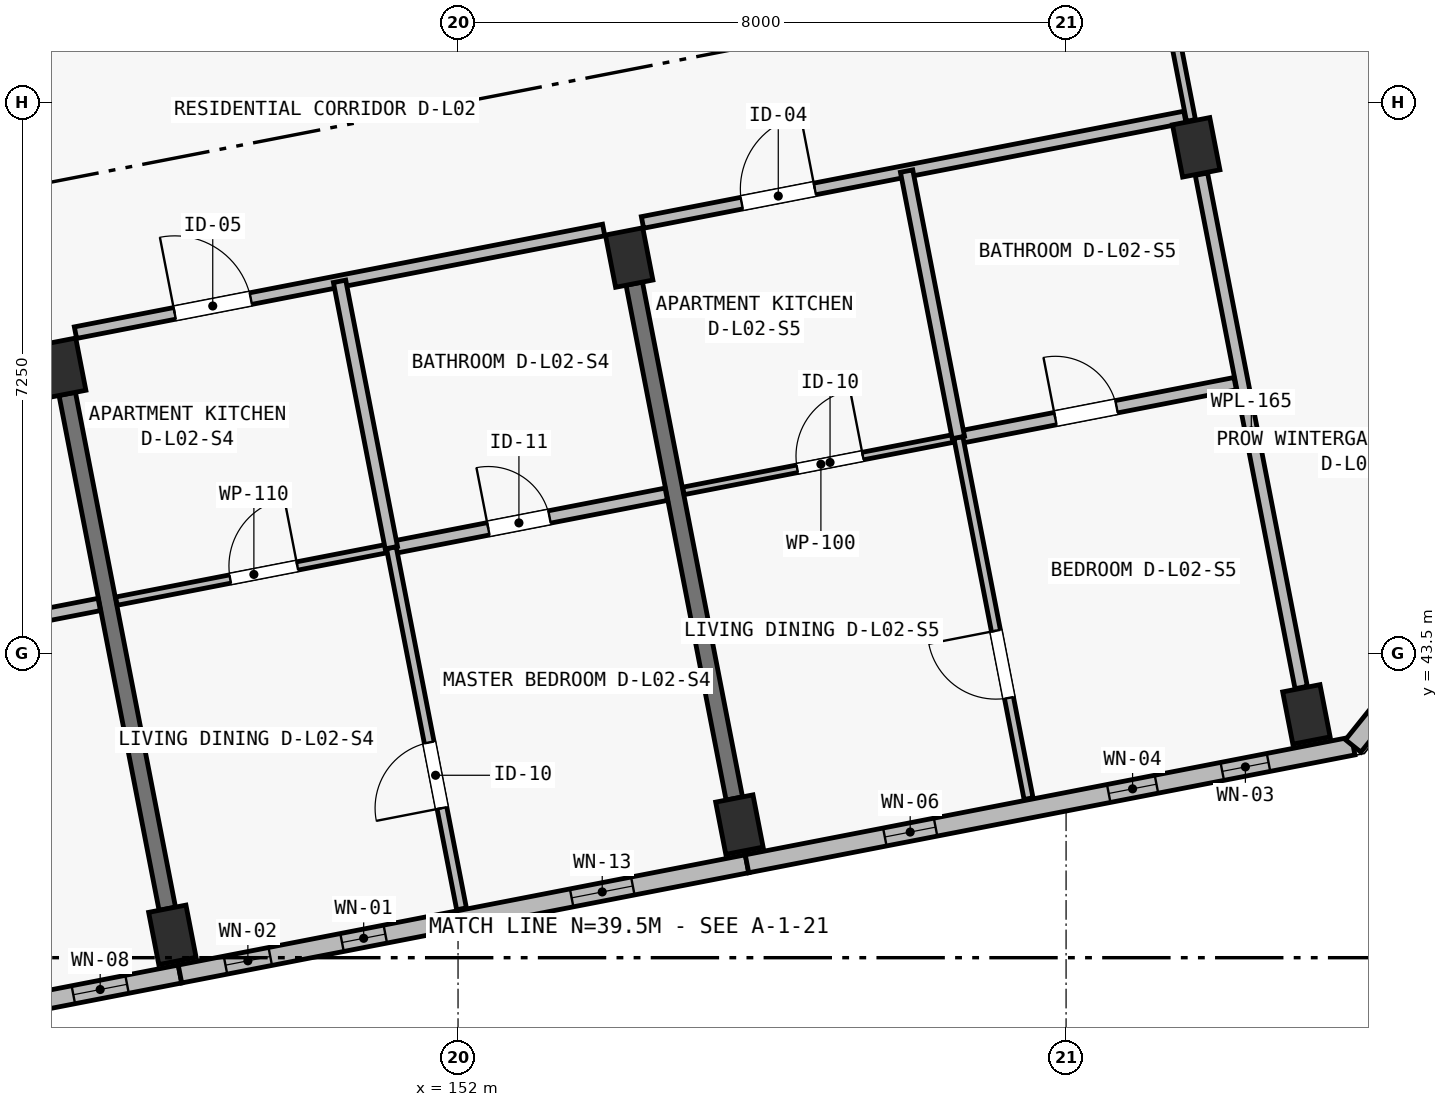
"""IFC4 building model, lengths in metres.
Left out: names, types, materials, properties, quantities, classifications, styles, units other than length and angle.
Written with IfcOpenShell. Run it as: python <this file> out.ifc"""

import sys

from ifc_helpers import new_model, si_unit, direction, frame, frame_2d, origin, origin_2d, place, context, subcontext, project, spatial, rectangle, extrude, element, fill, save


model = new_model("IFC4")
c1 = context("Model", 3, precision=1e-05, world=origin(), true_north=direction((0.0, 1.0)))
c2 = subcontext(c1, "Body", "Model", "MODEL_VIEW")
j1 = project(units=[si_unit("LENGTHUNIT", "METRE"), si_unit("PLANEANGLEUNIT", "RADIAN")], contexts=[c1])
p1 = place(None, origin())
s1 = spatial("IfcSite", under=j1, at=p1, CompositionType="ELEMENT")
p2 = place(p1, origin())
s2 = spatial("IfcBuilding", under=s1, at=p2, CompositionType="ELEMENT")
p3 = place(p2, frame((0.0, 0.0, 8.4)))
s3 = spatial("IfcBuildingStorey", under=s2, at=p3, CompositionType="ELEMENT", Elevation=8.4)
for number, where, z_axis, x_axis in (
    (1, (148.241, 39.801, 0.0), (0.0, 0.0, 1.0), (0.982, 0.191, 0.0)),
    (2, (146.791, 47.261, 0.0), (0.0, 0.0, 1.0), (0.982, 0.191, 0.0)),
    (3, (155.702, 41.251, 0.0), (0.0, 0.0, 1.0), (0.982, 0.191, 0.0)),
    (4, (154.252, 48.711, 0.0), (0.0, 0.0, 1.0), (0.982, 0.191, 0.0)),
    (5, (163.162, 42.701, 0.0), (0.0, 0.0, 1.0), (0.982, 0.191, 0.0)),
    (6, (161.712, 50.161, 0.0), (0.0, 0.0, 1.0), (0.982, 0.191, 0.0)),
):
    element("IfcColumn", number, at=place(p3, frame(where, z_axis=z_axis, x_axis=x_axis)), inside=s3, PredefinedType="COLUMN", context=c2, shape_type="SweptSolid", body=[
        extrude(rectangle(XDim=0.5, YDim=0.7, at=origin_2d()), origin(), (0.0, 0.0, 1.0), 3.25),
    ])
p4 = place(p3, frame((148.175, 40.144, 0.0), z_axis=(0.0, 0.0, 1.0), x_axis=(-0.190812837813, 0.981626436546, 0.0)))
e7 = element("IfcWall", 7, at=p4, inside=s3, PredefinedType="SHEAR", context=c2, shape_type="SweptSolid", body=[
    extrude(rectangle(XDim=6.9, YDim=0.22, at=frame_2d((3.45, 0.0))), origin(), (0.0, 0.0, 1.0), 2.5),
])
p5 = place(p3, frame((155.635, 41.594, 0.0), z_axis=(0.0, 0.0, 1.0), x_axis=(-0.190819465253, 0.981625148252, 0.0)))
e8 = element("IfcWall", 8, at=p5, inside=s3, PredefinedType="SHEAR", context=c2, shape_type="SweptSolid", body=[
    extrude(rectangle(XDim=6.9, YDim=0.22, at=frame_2d((3.45, 0.0))), origin(), (0.0, 0.0, 1.0), 2.5),
])
p6 = place(p3, frame((148.342, 39.285, 0.0), z_axis=(0.0, 0.0, 1.0), x_axis=(-0.981631269434, -0.190787973596, 0.0)))
e9 = element("IfcWall", 9, at=p6, inside=s3, PredefinedType="SOLIDWALL", context=c2, shape_type="SweptSolid", body=[
    extrude(rectangle(XDim=7.6, YDim=0.24, at=frame_2d((3.8, 0.0))), origin(), (0.0, 0.0, 1.0), 3.0),
])
p7 = place(p6, frame((0.71, 0.0, 0.52)))
e10 = element("IfcOpeningElement", 10, at=p7, cuts=e9, PredefinedType="OPENING", context=c2, shape_type="SweptSolid", body=[
    extrude(rectangle(XDim=0.72, YDim=2.16, at=frame_2d((0.36, 1.08))), frame((0.0, 0.135, 0.0), z_axis=(0.0, -1.0, 0.0), x_axis=(1.0, 0.0, 0.0)), (0.0, 0.0, 1.0), 0.27),
])
p8 = place(p6, frame((3.504, 0.0, 0.52)))
e11 = element("IfcOpeningElement", 11, at=p8, cuts=e9, PredefinedType="OPENING", context=c2, shape_type="SweptSolid", body=[
    extrude(rectangle(XDim=0.78, YDim=2.2, at=frame_2d((0.39, 1.1))), frame((0.0, 0.135, 0.0), z_axis=(0.0, -1.0, 0.0), x_axis=(1.0, 0.0, 0.0)), (0.0, 0.0, 1.0), 0.27),
])
p9 = place(p3, frame((155.802, 40.735, 0.0), z_axis=(0.0, 0.0, 1.0), x_axis=(-0.981626422232, -0.190812911449, 0.0)))
e12 = element("IfcWall", 12, at=p9, inside=s3, PredefinedType="SOLIDWALL", context=c2, shape_type="SweptSolid", body=[
    extrude(rectangle(XDim=7.6, YDim=0.24, at=frame_2d((3.8, 0.0))), origin(), (0.0, 0.0, 1.0), 3.0),
])
p10 = place(p9, frame((1.531, 0.0, 0.42)))
e13 = element("IfcOpeningElement", 13, at=p10, cuts=e12, PredefinedType="OPENING", context=c2, shape_type="SweptSolid", body=[
    extrude(rectangle(XDim=0.82, YDim=2.18, at=frame_2d((0.41, 1.09))), frame((0.0, 0.135, 0.0), z_axis=(0.0, -1.0, 0.0), x_axis=(1.0, 0.0, 0.0)), (0.0, 0.0, 1.0), 0.27),
])
p11 = place(p9, frame((4.848, 0.0, 0.42)))
e14 = element("IfcOpeningElement", 14, at=p11, cuts=e12, PredefinedType="OPENING", context=c2, shape_type="SweptSolid", body=[
    extrude(rectangle(XDim=0.58, YDim=2.16, at=frame_2d((0.29, 1.08))), frame((0.0, 0.135, 0.0), z_axis=(0.0, -1.0, 0.0), x_axis=(1.0, 0.0, 0.0)), (0.0, 0.0, 1.0), 0.27),
])
p12 = place(p9, frame((6.39, 0.0, 0.48)))
e15 = element("IfcOpeningElement", 15, at=p12, cuts=e12, PredefinedType="OPENING", context=c2, shape_type="SweptSolid", body=[
    extrude(rectangle(XDim=0.6, YDim=2.22, at=frame_2d((0.3, 1.11))), frame((0.0, 0.135, 0.0), z_axis=(0.0, -1.0, 0.0), x_axis=(1.0, 0.0, 0.0)), (0.0, 0.0, 1.0), 0.27),
])
p13 = place(p3, frame((163.778, 42.286, 0.0), z_axis=(0.0, 0.0, 1.0), x_axis=(-0.981628367112, -0.190802905848, 0.0)))
e16 = element("IfcWall", 16, at=p13, inside=s3, PredefinedType="SOLIDWALL", context=c2, shape_type="SweptSolid", body=[
    extrude(rectangle(XDim=8.125, YDim=0.24, at=frame_2d((4.062, 0.0))), origin(), (0.0, 0.0, 1.0), 3.0),
])
p14 = place(p13, frame((1.135, 0.0, 0.48)))
e17 = element("IfcOpeningElement", 17, at=p14, cuts=e16, PredefinedType="OPENING", context=c2, shape_type="SweptSolid", body=[
    extrude(rectangle(XDim=0.62, YDim=2.28, at=frame_2d((0.31, 1.14))), frame((0.0, 0.135, 0.0), z_axis=(0.0, -1.0, 0.0), x_axis=(1.0, 0.0, 0.0)), (0.0, 0.0, 1.0), 0.27),
])
p15 = place(p13, frame((2.637, 0.0, 0.52)))
e18 = element("IfcOpeningElement", 18, at=p15, cuts=e16, PredefinedType="OPENING", context=c2, shape_type="SweptSolid", body=[
    extrude(rectangle(XDim=0.64, YDim=2.18, at=frame_2d((0.32, 1.09))), frame((0.0, 0.135, 0.0), z_axis=(0.0, -1.0, 0.0), x_axis=(1.0, 0.0, 0.0)), (0.0, 0.0, 1.0), 0.27),
])
p16 = place(p13, frame((5.598, 0.0, 0.48)))
e19 = element("IfcOpeningElement", 19, at=p16, cuts=e16, PredefinedType="OPENING", context=c2, shape_type="SweptSolid", body=[
    extrude(rectangle(XDim=0.68, YDim=2.24, at=frame_2d((0.34, 1.12))), frame((0.0, 0.135, 0.0), z_axis=(0.0, -1.0, 0.0), x_axis=(1.0, 0.0, 0.0)), (0.0, 0.0, 1.0), 0.27),
])
p17 = place(p3, frame((159.837, 62.556, 0.0), z_axis=(0.0, 0.0, 1.0), x_axis=(0.389225507936, -0.921142499276, 0.0)))
e20 = element("IfcWall", 20, at=p17, inside=s3, PredefinedType="SOLIDWALL", context=c2, shape_type="SweptSolid", body=[
    extrude(rectangle(XDim=17.91, YDim=0.26, at=frame_2d((8.955, 0.0))), origin(), (0.0, 0.0, 1.0), 3.0),
])
p18 = place(p17, frame((2.81, 0.0, 0.45)))
e21 = element("IfcOpeningElement", 21, at=p18, cuts=e20, PredefinedType="OPENING", context=c2, shape_type="SweptSolid", body=[
    extrude(rectangle(XDim=0.66, YDim=2.32, at=frame_2d((0.33, 1.16))), frame((0.0, 0.145, 0.0), z_axis=(0.0, -1.0, 0.0), x_axis=(1.0, 0.0, 0.0)), (0.0, 0.0, 1.0), 0.29),
])
p19 = place(p17, frame((14.3, 0.0, 0.52)))
e22 = element("IfcOpeningElement", 22, at=p19, cuts=e20, PredefinedType="OPENING", context=c2, shape_type="SweptSolid", body=[
    extrude(rectangle(XDim=0.8, YDim=2.3, at=frame_2d((0.4, 1.15))), frame((0.0, 0.145, 0.0), z_axis=(0.0, -1.0, 0.0), x_axis=(1.0, 0.0, 0.0)), (0.0, 0.0, 1.0), 0.29),
])
p20 = place(p3, frame((166.809, 46.058, 0.0), z_axis=(0.0, 0.0, 1.0), x_axis=(-0.626281072923, -0.779597343312, 0.0)))
e23 = element("IfcWall", 23, at=p20, inside=s3, PredefinedType="SOLIDWALL", context=c2, shape_type="SweptSolid", body=[
    extrude(rectangle(XDim=4.839, YDim=0.26, at=frame_2d((2.42, 0.0))), origin(), (0.0, 0.0, 1.0), 3.0),
])
p21 = place(p3, frame((161.643, 50.515, 0.0), z_axis=(0.0, 0.0, 1.0), x_axis=(-0.190805731561, 0.981627817864, 0.0)))
e24 = element("IfcWall", 24, at=p21, inside=s3, PredefinedType="PARTITIONING", context=c2, shape_type="SweptSolid", body=[
    extrude(rectangle(XDim=3.68, YDim=0.12, at=frame_2d((1.84, 0.0))), origin(), (0.0, 0.0, 1.0), 2.5),
])
p22 = place(p21, frame((1.35, 0.0, 0.0)))
e25 = element("IfcOpeningElement", 25, at=p22, cuts=e24, PredefinedType="OPENING", context=c2, shape_type="SweptSolid", body=[
    extrude(rectangle(XDim=0.88, YDim=2.1, at=frame_2d((0.44, 1.05))), frame((0.0, 0.075, 0.0), z_axis=(0.0, -1.0, 0.0), x_axis=(1.0, 0.0, 0.0)), (0.0, 0.0, 1.0), 0.15),
])
p23 = place(p3, frame((163.094, 43.054, 0.0), z_axis=(0.0, 0.0, 1.0), x_axis=(-0.190804123115, 0.981628130507, 0.0)))
e26 = element("IfcWall", 26, at=p23, inside=s3, PredefinedType="PLUMBINGWALL", context=c2, shape_type="SweptSolid", body=[
    extrude(rectangle(XDim=6.88, YDim=0.165, at=frame_2d((3.44, 0.0))), origin(), (0.0, 0.0, 1.0), 2.5),
])
p24 = place(p3, frame((145.031, 43.71, 0.0), z_axis=(0.0, 0.0, 1.0), x_axis=(0.981624265801, 0.190824004755, 0.0)))
e27 = element("IfcWall", 27, at=p24, inside=s3, PredefinedType="PLUMBINGWALL", context=c2, shape_type="SweptSolid", body=[
    extrude(rectangle(XDim=2.29, YDim=0.165, at=frame_2d((1.145, 0.0))), origin(), (0.0, 0.0, 1.0), 2.97),
])
p25 = place(p24, frame((0.602, 0.0, 0.0)))
e28 = element("IfcOpeningElement", 28, at=p25, cuts=e27, PredefinedType="OPENING", context=c2, shape_type="SweptSolid", body=[
    extrude(rectangle(XDim=0.82, YDim=2.08, at=frame_2d((0.41, 1.04))), frame((0.0, 0.097, 0.0), z_axis=(0.0, -1.0, 0.0), x_axis=(1.0, 0.0, 0.0)), (0.0, 0.0, 1.0), 0.195),
])
p26 = place(p3, frame((146.966, 47.723, 0.0), z_axis=(0.0, 0.0, 1.0), x_axis=(0.981629923556, 0.190794898199, 0.0)))
e29 = element("IfcWall", 29, at=p26, inside=s3, PredefinedType="PARTITIONING", context=c2, shape_type="SweptSolid", body=[
    extrude(rectangle(XDim=7.08, YDim=0.155, at=frame_2d((3.54, 0.0))), origin(), (0.0, 0.0, 1.0), 2.97),
])
p27 = place(p26, frame((1.33, 0.0, 0.0)))
e30 = element("IfcOpeningElement", 30, at=p27, cuts=e29, PredefinedType="OPENING", context=c2, shape_type="SweptSolid", body=[
    extrude(rectangle(XDim=1.02, YDim=2.2, at=frame_2d((0.51, 1.1))), frame((0.0, 0.093, 0.0), z_axis=(0.0, -1.0, 0.0), x_axis=(1.0, 0.0, 0.0)), (0.0, 0.0, 1.0), 0.185),
])
p28 = place(p3, frame((147.505, 44.191, 0.0), z_axis=(0.0, 0.0, 1.0), x_axis=(0.981626422232, 0.190812911449, 0.0)))
e31 = element("IfcWall", 31, at=p28, inside=s3, PredefinedType="PARTITIONING", context=c2, shape_type="SweptSolid", body=[
    extrude(rectangle(XDim=3.685, YDim=0.11, at=frame_2d((1.842, 0.0))), origin(), (0.0, 0.0, 1.0), 2.97),
])
p29 = place(p28, frame((1.525, 0.0, 0.0)))
e32 = element("IfcOpeningElement", 32, at=p29, cuts=e31, PredefinedType="OPENING", context=c2, shape_type="SweptSolid", body=[
    extrude(rectangle(XDim=0.9, YDim=2.1, at=frame_2d((0.45, 1.05))), frame((0.0, 0.07, 0.0), z_axis=(0.0, -1.0, 0.0), x_axis=(1.0, 0.0, 0.0)), (0.0, 0.0, 1.0), 0.14),
])
p30 = place(p3, frame((151.123, 44.894, 0.0), z_axis=(0.0, 0.0, 1.0), x_axis=(0.981626422232, 0.190812911449, 0.0)))
e33 = element("IfcWall", 33, at=p30, inside=s3, PredefinedType="PLUMBINGWALL", context=c2, shape_type="SweptSolid", body=[
    extrude(rectangle(XDim=3.685, YDim=0.165, at=frame_2d((1.842, 0.0))), origin(), (0.0, 0.0, 1.0), 2.97),
])
p31 = place(p30, frame((1.3, 0.0, 0.0)))
e34 = element("IfcOpeningElement", 34, at=p31, cuts=e33, PredefinedType="OPENING", context=c2, shape_type="SweptSolid", body=[
    extrude(rectangle(XDim=0.82, YDim=2.08, at=frame_2d((0.41, 1.04))), frame((0.0, 0.097, 0.0), z_axis=(0.0, -1.0, 0.0), x_axis=(1.0, 0.0, 0.0)), (0.0, 0.0, 1.0), 0.195),
])
p32 = place(p3, frame((152.046, 40.143, 0.0), z_axis=(0.0, 0.0, 1.0), x_axis=(-0.190826454074, 0.98162378966, 0.0)))
e35 = element("IfcWall", 35, at=p32, inside=s3, PredefinedType="PARTITIONING", context=c2, shape_type="SweptSolid", body=[
    extrude(rectangle(XDim=4.84, YDim=0.13, at=frame_2d((2.42, 0.0))), origin(), (0.0, 0.0, 1.0), 2.97),
])
p33 = place(p32, frame((1.35, 0.0, 0.0)))
e36 = element("IfcOpeningElement", 36, at=p33, cuts=e35, PredefinedType="OPENING", context=c2, shape_type="SweptSolid", body=[
    extrude(rectangle(XDim=0.88, YDim=2.1, at=frame_2d((0.44, 1.05))), frame((0.0, 0.08, 0.0), z_axis=(0.0, -1.0, 0.0), x_axis=(1.0, 0.0, 0.0)), (0.0, 0.0, 1.0), 0.16),
])
p34 = place(p3, frame((151.123, 44.894, 0.0), z_axis=(0.0, 0.0, 1.0), x_axis=(-0.190787294327, 0.981631401455, 0.0)))
e37 = element("IfcWall", 37, at=p34, inside=s3, PredefinedType="PLUMBINGWALL", context=c2, shape_type="SweptSolid", body=[
    extrude(rectangle(XDim=3.57, YDim=0.165, at=frame_2d((1.785, 0.0))), origin(), (0.0, 0.0, 1.0), 2.97),
])
p35 = place(p3, frame((154.427, 49.173, 0.0), z_axis=(0.0, 0.0, 1.0), x_axis=(0.981626748283, 0.190811234092, 0.0)))
e38 = element("IfcWall", 38, at=p35, inside=s3, PredefinedType="PARTITIONING", context=c2, shape_type="SweptSolid", body=[
    extrude(rectangle(XDim=7.27, YDim=0.155, at=frame_2d((3.635, 0.0))), origin(), (0.0, 0.0, 1.0), 2.97),
])
p36 = place(p35, frame((1.33, 0.0, 0.0)))
e39 = element("IfcOpeningElement", 39, at=p36, cuts=e38, PredefinedType="OPENING", context=c2, shape_type="SweptSolid", body=[
    extrude(rectangle(XDim=0.98, YDim=2.15, at=frame_2d((0.49, 1.075))), frame((0.0, 0.093, 0.0), z_axis=(0.0, -1.0, 0.0), x_axis=(1.0, 0.0, 0.0)), (0.0, 0.0, 1.0), 0.185),
])
p37 = place(p3, frame((154.966, 45.641, 0.0), z_axis=(0.0, 0.0, 1.0), x_axis=(0.981628834294, 0.190800502313, 0.0)))
e40 = element("IfcWall", 40, at=p37, inside=s3, PredefinedType="PARTITIONING", context=c2, shape_type="SweptSolid", body=[
    extrude(rectangle(XDim=3.685, YDim=0.1, at=frame_2d((1.843, 0.0))), origin(), (0.0, 0.0, 1.0), 2.97),
])
p38 = place(p37, frame((1.525, 0.0, 0.0)))
e41 = element("IfcOpeningElement", 41, at=p38, cuts=e40, PredefinedType="OPENING", context=c2, shape_type="SweptSolid", body=[
    extrude(rectangle(XDim=0.88, YDim=2.1, at=frame_2d((0.44, 1.05))), frame((0.0, 0.065, 0.0), z_axis=(0.0, -1.0, 0.0), x_axis=(1.0, 0.0, 0.0)), (0.0, 0.0, 1.0), 0.13),
])
p39 = place(p3, frame((158.583, 46.344, 0.0), z_axis=(0.0, 0.0, 1.0), x_axis=(0.981621896267, 0.190836193549, 0.0)))
e42 = element("IfcWall", 42, at=p39, inside=s3, PredefinedType="PLUMBINGWALL", context=c2, shape_type="SweptSolid", body=[
    extrude(rectangle(XDim=3.71, YDim=0.165, at=frame_2d((1.855, 0.0))), origin(), (0.0, 0.0, 1.0), 2.97),
])
p40 = place(p39, frame((1.3, 0.0, 0.0)))
e43 = element("IfcOpeningElement", 43, at=p40, cuts=e42, PredefinedType="OPENING", context=c2, shape_type="SweptSolid", body=[
    extrude(rectangle(XDim=0.82, YDim=2.08, at=frame_2d((0.41, 1.04))), frame((0.0, 0.097, 0.0), z_axis=(0.0, -1.0, 0.0), x_axis=(1.0, 0.0, 0.0)), (0.0, 0.0, 1.0), 0.195),
])
p41 = place(p3, frame((159.506, 41.593, 0.0), z_axis=(0.0, 0.0, 1.0), x_axis=(-0.190777847092, 0.981633237548, 0.0)))
e44 = element("IfcWall", 44, at=p41, inside=s3, PredefinedType="PARTITIONING", context=c2, shape_type="SweptSolid", body=[
    extrude(rectangle(XDim=4.84, YDim=0.12, at=frame_2d((2.42, 0.0))), origin(), (0.0, 0.0, 1.0), 2.97),
])
p42 = place(p41, frame((1.35, 0.0, 0.0)))
e45 = element("IfcOpeningElement", 45, at=p42, cuts=e44, PredefinedType="OPENING", context=c2, shape_type="SweptSolid", body=[
    extrude(rectangle(XDim=0.9, YDim=2.1, at=frame_2d((0.45, 1.05))), frame((0.0, 0.075, 0.0), z_axis=(0.0, -1.0, 0.0), x_axis=(1.0, 0.0, 0.0)), (0.0, 0.0, 1.0), 0.15),
])
p43 = place(p3, frame((158.583, 46.344, 0.0), z_axis=(0.0, 0.0, 1.0), x_axis=(-0.190865998276, 0.981616101489, 0.0)))
e46 = element("IfcWall", 46, at=p43, inside=s3, PredefinedType="PLUMBINGWALL", context=c2, shape_type="SweptSolid", body=[
    extrude(rectangle(XDim=3.57, YDim=0.165, at=frame_2d((1.785, 0.0))), origin(), (0.0, 0.0, 1.0), 2.97),
])
p44 = place(p7, origin())
e47 = element("IfcWindow", 47, at=p44, inside=s3, PartitioningType="SINGLE_PANEL", PredefinedType="WINDOW", context=c2, shape_type="SweptSolid", body=[
    extrude(rectangle(XDim=0.72, YDim=2.16, at=frame_2d((0.36, 1.08))), frame((0.0, 0.03, 0.0), z_axis=(0.0, -1.0, 0.0), x_axis=(1.0, 0.0, 0.0)), (0.0, 0.0, 1.0), 0.06),
])
fill(e10, e47)
p45 = place(p10, origin())
e48 = element("IfcWindow", 48, at=p45, inside=s3, PartitioningType="SINGLE_PANEL", PredefinedType="WINDOW", context=c2, shape_type="SweptSolid", body=[
    extrude(rectangle(XDim=0.82, YDim=2.18, at=frame_2d((0.41, 1.09))), frame((0.0, 0.03, 0.0), z_axis=(0.0, -1.0, 0.0), x_axis=(1.0, 0.0, 0.0)), (0.0, 0.0, 1.0), 0.06),
])
fill(e13, e48)
p46 = place(p11, origin())
e49 = element("IfcWindow", 49, at=p46, inside=s3, PartitioningType="SINGLE_PANEL", PredefinedType="WINDOW", context=c2, shape_type="SweptSolid", body=[
    extrude(rectangle(XDim=0.58, YDim=2.16, at=frame_2d((0.29, 1.08))), frame((0.0, 0.03, 0.0), z_axis=(0.0, -1.0, 0.0), x_axis=(1.0, 0.0, 0.0)), (0.0, 0.0, 1.0), 0.06),
])
fill(e14, e49)
p47 = place(p12, origin())
e50 = element("IfcWindow", 50, at=p47, inside=s3, PartitioningType="SINGLE_PANEL", PredefinedType="WINDOW", context=c2, shape_type="SweptSolid", body=[
    extrude(rectangle(XDim=0.6, YDim=2.22, at=frame_2d((0.3, 1.11))), frame((0.0, 0.03, 0.0), z_axis=(0.0, -1.0, 0.0), x_axis=(1.0, 0.0, 0.0)), (0.0, 0.0, 1.0), 0.06),
])
fill(e15, e50)
p48 = place(p14, origin())
e51 = element("IfcWindow", 51, at=p48, inside=s3, PartitioningType="SINGLE_PANEL", PredefinedType="WINDOW", context=c2, shape_type="SweptSolid", body=[
    extrude(rectangle(XDim=0.62, YDim=2.28, at=frame_2d((0.31, 1.14))), frame((0.0, 0.03, 0.0), z_axis=(0.0, -1.0, 0.0), x_axis=(1.0, 0.0, 0.0)), (0.0, 0.0, 1.0), 0.06),
])
fill(e17, e51)
p49 = place(p15, origin())
e52 = element("IfcWindow", 52, at=p49, inside=s3, PartitioningType="SINGLE_PANEL", PredefinedType="WINDOW", context=c2, shape_type="SweptSolid", body=[
    extrude(rectangle(XDim=0.64, YDim=2.18, at=frame_2d((0.32, 1.09))), frame((0.0, 0.03, 0.0), z_axis=(0.0, -1.0, 0.0), x_axis=(1.0, 0.0, 0.0)), (0.0, 0.0, 1.0), 0.06),
])
fill(e18, e52)
p50 = place(p16, origin())
e53 = element("IfcWindow", 53, at=p50, inside=s3, PartitioningType="SINGLE_PANEL", PredefinedType="WINDOW", context=c2, shape_type="SweptSolid", body=[
    extrude(rectangle(XDim=0.68, YDim=2.24, at=frame_2d((0.34, 1.12))), frame((0.0, 0.03, 0.0), z_axis=(0.0, -1.0, 0.0), x_axis=(1.0, 0.0, 0.0)), (0.0, 0.0, 1.0), 0.06),
])
fill(e19, e53)
p51 = place(p27, origin())
e54 = element("IfcDoor", 54, at=p51, inside=s3, OperationType="SINGLE_SWING_LEFT", PredefinedType="DOOR", context=c2, shape_type="SweptSolid", body=[
    extrude(rectangle(XDim=1.02, YDim=2.2, at=frame_2d((0.51, 1.1))), frame((0.0, 0.025, 0.0), z_axis=(0.0, -1.0, 0.0), x_axis=(1.0, 0.0, 0.0)), (0.0, 0.0, 1.0), 0.05),
])
fill(e30, e54)
p52 = place(p29, origin())
e55 = element("IfcDoor", 55, at=p52, inside=s3, OperationType="SINGLE_SWING_RIGHT", PredefinedType="DOOR", context=c2, shape_type="SweptSolid", body=[
    extrude(rectangle(XDim=0.9, YDim=2.1, at=frame_2d((0.45, 1.05))), frame((0.0, 0.025, 0.0), z_axis=(0.0, -1.0, 0.0), x_axis=(1.0, 0.0, 0.0)), (0.0, 0.0, 1.0), 0.05),
])
fill(e32, e55)
p53 = place(p31, origin())
e56 = element("IfcDoor", 56, at=p53, inside=s3, OperationType="SINGLE_SWING_LEFT", PredefinedType="DOOR", context=c2, shape_type="SweptSolid", body=[
    extrude(rectangle(XDim=0.82, YDim=2.08, at=frame_2d((0.41, 1.04))), frame((0.0, 0.025, 0.0), z_axis=(0.0, -1.0, 0.0), x_axis=(1.0, 0.0, 0.0)), (0.0, 0.0, 1.0), 0.05),
])
fill(e34, e56)
p54 = place(p33, origin())
e57 = element("IfcDoor", 57, at=p54, inside=s3, OperationType="SINGLE_SWING_LEFT", PredefinedType="DOOR", context=c2, shape_type="SweptSolid", body=[
    extrude(rectangle(XDim=0.88, YDim=2.1, at=frame_2d((0.44, 1.05))), frame((0.0, 0.025, 0.0), z_axis=(0.0, -1.0, 0.0), x_axis=(1.0, 0.0, 0.0)), (0.0, 0.0, 1.0), 0.05),
])
fill(e36, e57)
p55 = place(p36, origin())
e58 = element("IfcDoor", 58, at=p55, inside=s3, OperationType="SINGLE_SWING_RIGHT", PredefinedType="DOOR", context=c2, shape_type="SweptSolid", body=[
    extrude(rectangle(XDim=0.98, YDim=2.15, at=frame_2d((0.49, 1.075))), frame((0.0, 0.025, 0.0), z_axis=(0.0, -1.0, 0.0), x_axis=(1.0, 0.0, 0.0)), (0.0, 0.0, 1.0), 0.05),
])
fill(e39, e58)
p56 = place(p38, origin())
e59 = element("IfcDoor", 59, at=p56, inside=s3, OperationType="SINGLE_SWING_RIGHT", PredefinedType="DOOR", context=c2, shape_type="SweptSolid", body=[
    extrude(rectangle(XDim=0.88, YDim=2.1, at=frame_2d((0.44, 1.05))), frame((0.0, 0.025, 0.0), z_axis=(0.0, -1.0, 0.0), x_axis=(1.0, 0.0, 0.0)), (0.0, 0.0, 1.0), 0.05),
])
fill(e41, e59)
p57 = place(p40, origin())
e60 = element("IfcDoor", 60, at=p57, inside=s3, OperationType="SINGLE_SWING_LEFT", PredefinedType="DOOR", context=c2, shape_type="SweptSolid", body=[
    extrude(rectangle(XDim=0.82, YDim=2.08, at=frame_2d((0.41, 1.04))), frame((0.0, 0.025, 0.0), z_axis=(0.0, -1.0, 0.0), x_axis=(1.0, 0.0, 0.0)), (0.0, 0.0, 1.0), 0.05),
])
fill(e43, e60)
p58 = place(p42, origin())
e61 = element("IfcDoor", 61, at=p58, inside=s3, OperationType="SINGLE_SWING_RIGHT", PredefinedType="DOOR", context=c2, shape_type="SweptSolid", body=[
    extrude(rectangle(XDim=0.9, YDim=2.1, at=frame_2d((0.45, 1.05))), frame((0.0, 0.025, 0.0), z_axis=(0.0, -1.0, 0.0), x_axis=(1.0, 0.0, 0.0)), (0.0, 0.0, 1.0), 0.05),
])
fill(e45, e61)
save(model, sys.argv[1])
